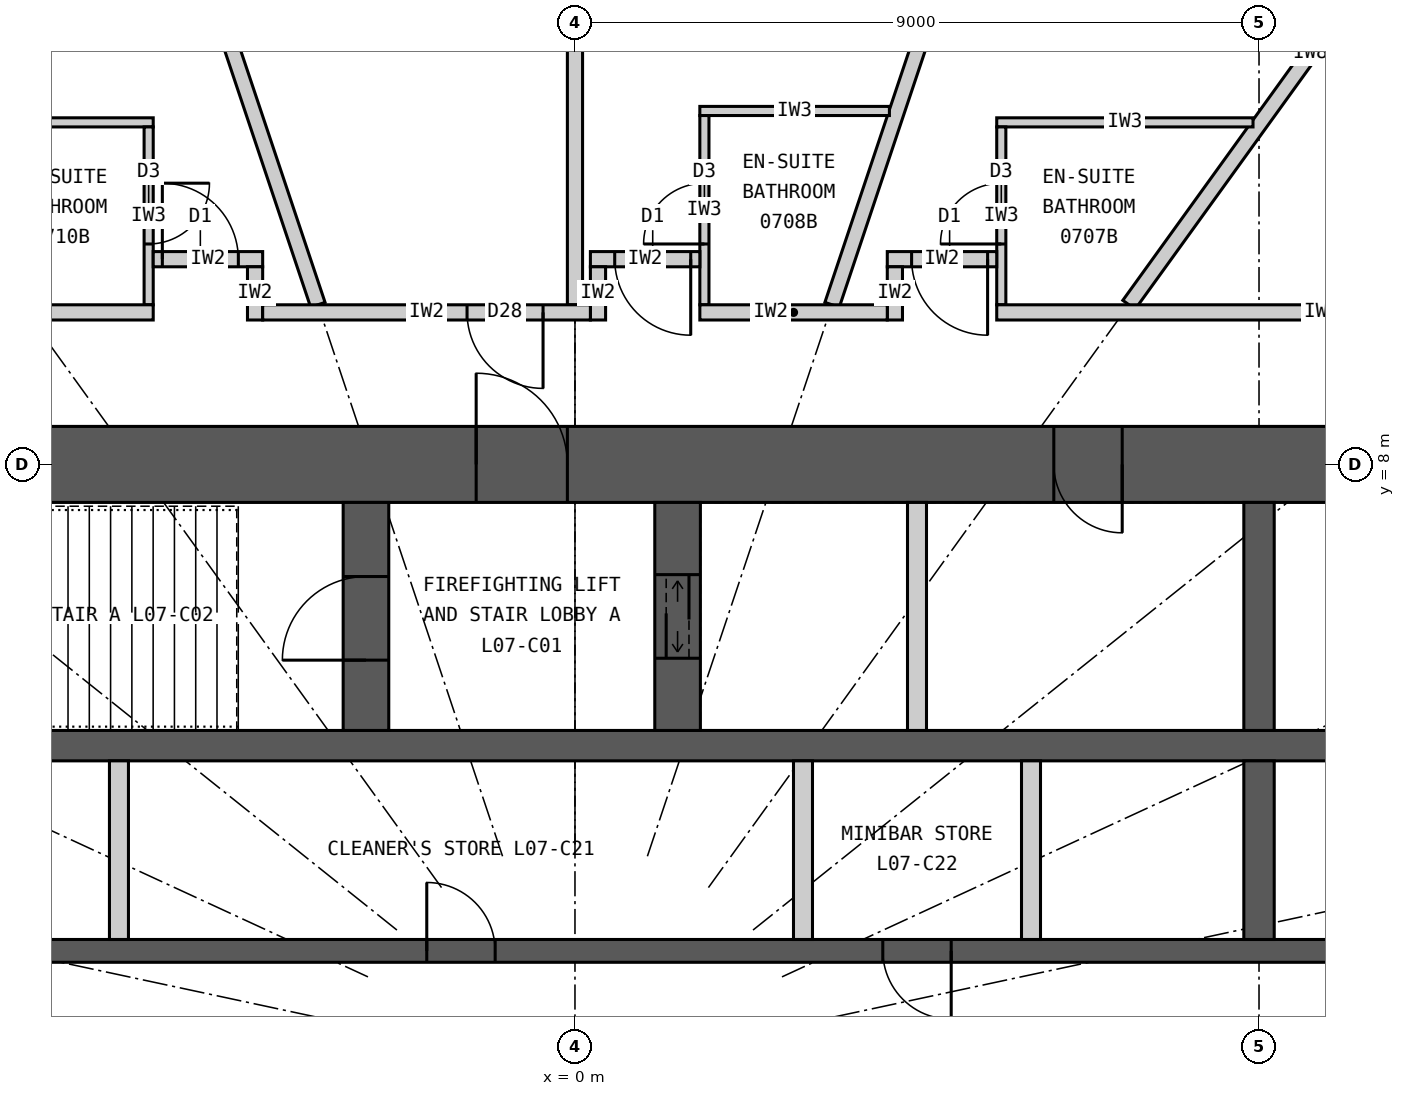
"""IFC4 building model, lengths in metres.
Left out: names, types, materials, properties, quantities, classifications, styles, units other than length and angle.
Written with IfcOpenShell. Run it as: python <this file> out.ifc"""

import sys

from ifc_helpers import new_model, si_unit, direction, frame, frame_2d, origin, place, context, subcontext, project, spatial, rectangle, extrude, element, fill, save


model = new_model("IFC4")
c1 = context("Model", 3, precision=1e-05, world=origin(), true_north=direction((0.0, 1.0)))
c2 = subcontext(c1, "Body", "Model", "MODEL_VIEW")
j1 = project(units=[si_unit("LENGTHUNIT", "METRE"), si_unit("PLANEANGLEUNIT", "RADIAN")], contexts=[c1])
p1 = place(None, origin())
s1 = spatial("IfcSite", under=j1, at=p1, CompositionType="ELEMENT")
p2 = place(p1, origin())
s2 = spatial("IfcBuilding", under=s1, at=p2, CompositionType="ELEMENT")
p3 = place(p2, frame((0.0, 0.0, 36.0)))
s3 = spatial("IfcBuildingStorey", under=s2, at=p3, CompositionType="ELEMENT", Elevation=36.0)
p4 = place(p3, frame((-12.5, 8.0, 0.0), z_axis=(0.0, 0.0, 1.0), x_axis=(1.0, 0.0, 0.0)))
e1 = element("IfcWall", 1, at=p4, inside=s3, PredefinedType="SHEAR", context=c2, shape_type="SweptSolid", body=[
    extrude(rectangle(XDim=25.0, YDim=1.0, at=frame_2d((12.5, 0.0))), origin(), (0.0, 0.0, 1.0), 3.3),
])
p5 = place(p4, frame((11.2, 0.0, 0.0)))
e2 = element("IfcOpeningElement", 2, at=p5, cuts=e1, PredefinedType="OPENING", context=c2, shape_type="SweptSolid", body=[
    extrude(rectangle(XDim=1.2, YDim=2.2, at=frame_2d((0.6, 1.1))), frame((0.0, 0.51, 0.0), z_axis=(0.0, -1.0, 0.0), x_axis=(1.0, 0.0, 0.0)), (0.0, 0.0, 1.0), 1.02),
])
p6 = place(p4, frame((18.8, 0.0, 0.0)))
e3 = element("IfcOpeningElement", 3, at=p6, cuts=e1, PredefinedType="OPENING", context=c2, shape_type="SweptSolid", body=[
    extrude(rectangle(XDim=0.9, YDim=2.2, at=frame_2d((0.45, 1.1))), frame((0.0, 0.51, 0.0), z_axis=(0.0, -1.0, 0.0), x_axis=(1.0, 0.0, 0.0)), (0.0, 0.0, 1.0), 1.02),
])
p7 = place(p3, frame((-11.5, 4.3, 0.0), z_axis=(0.0, 0.0, 1.0), x_axis=(1.0, 0.0, 0.0)))
e4 = element("IfcWall", 4, at=p7, inside=s3, PredefinedType="SHEAR", context=c2, shape_type="SweptSolid", body=[
    extrude(rectangle(XDim=23.0, YDim=0.4, at=frame_2d((11.5, 0.0))), origin(), (0.0, 0.0, 1.0), 3.3),
])
p8 = place(p3, frame((-11.5, 1.6, 0.0), z_axis=(0.0, 0.0, 1.0), x_axis=(1.0, 0.0, 0.0)))
e5 = element("IfcWall", 5, at=p8, inside=s3, PredefinedType="SHEAR", context=c2, shape_type="SweptSolid", body=[
    extrude(rectangle(XDim=23.0, YDim=0.3, at=frame_2d((11.5, 0.0))), origin(), (0.0, 0.0, 1.0), 3.3),
])
p9 = place(p8, frame((0.45, 0.0, 0.0)))
e6 = element("IfcOpeningElement", 6, at=p9, cuts=e5, PredefinedType="OPENING", context=c2, shape_type="SweptSolid", body=[
    extrude(rectangle(XDim=1.1, YDim=2.2, at=frame_2d((0.55, 1.1))), frame((0.0, 0.16, 0.0), z_axis=(0.0, -1.0, 0.0), x_axis=(1.0, 0.0, 0.0)), (0.0, 0.0, 1.0), 0.32),
])
p10 = place(p8, frame((3.45, 0.0, 0.0)))
e7 = element("IfcOpeningElement", 7, at=p10, cuts=e5, PredefinedType="OPENING", context=c2, shape_type="SweptSolid", body=[
    extrude(rectangle(XDim=1.1, YDim=2.2, at=frame_2d((0.55, 1.1))), frame((0.0, 0.16, 0.0), z_axis=(0.0, -1.0, 0.0), x_axis=(1.0, 0.0, 0.0)), (0.0, 0.0, 1.0), 0.32),
])
p11 = place(p8, frame((9.55, 0.0, 0.0)))
e8 = element("IfcOpeningElement", 8, at=p11, cuts=e5, PredefinedType="OPENING", context=c2, shape_type="SweptSolid", body=[
    extrude(rectangle(XDim=0.9, YDim=2.2, at=frame_2d((0.45, 1.1))), frame((0.0, 0.16, 0.0), z_axis=(0.0, -1.0, 0.0), x_axis=(1.0, 0.0, 0.0)), (0.0, 0.0, 1.0), 0.32),
])
p12 = place(p8, frame((15.55, 0.0, 0.0)))
e9 = element("IfcOpeningElement", 9, at=p12, cuts=e5, PredefinedType="OPENING", context=c2, shape_type="SweptSolid", body=[
    extrude(rectangle(XDim=0.9, YDim=2.2, at=frame_2d((0.45, 1.1))), frame((0.0, 0.16, 0.0), z_axis=(0.0, -1.0, 0.0), x_axis=(1.0, 0.0, 0.0)), (0.0, 0.0, 1.0), 0.32),
])
p13 = place(p3, frame((9.0, 4.5, 0.0), z_axis=(0.0, 0.0, 1.0), x_axis=(0.0, 1.0, 0.0)))
e10 = element("IfcWall", 10, at=p13, inside=s3, PredefinedType="SHEAR", context=c2, shape_type="SweptSolid", body=[
    extrude(rectangle(XDim=3.0, YDim=0.4, at=frame_2d((1.5, 0.0))), origin(), (0.0, 0.0, 1.0), 3.3),
])
p14 = place(p3, frame((9.0, 1.75, 0.0), z_axis=(0.0, 0.0, 1.0), x_axis=(0.0, 1.0, 0.0)))
e11 = element("IfcWall", 11, at=p14, inside=s3, PredefinedType="SHEAR", context=c2, shape_type="SweptSolid", body=[
    extrude(rectangle(XDim=2.35, YDim=0.4, at=frame_2d((1.175, 0.0))), origin(), (0.0, 0.0, 1.0), 3.3),
])
p15 = place(p3, frame((-2.75, 4.5, 0.0), z_axis=(0.0, 0.0, 1.0), x_axis=(0.0, 1.0, 0.0)))
e12 = element("IfcWall", 12, at=p15, inside=s3, PredefinedType="SHEAR", context=c2, shape_type="SweptSolid", body=[
    extrude(rectangle(XDim=3.0, YDim=0.6, at=frame_2d((1.5, 0.0))), origin(), (0.0, 0.0, 1.0), 3.3),
])
p16 = place(p15, frame((0.925, 0.0, 0.0)))
e13 = element("IfcOpeningElement", 13, at=p16, cuts=e12, PredefinedType="OPENING", context=c2, shape_type="SweptSolid", body=[
    extrude(rectangle(XDim=1.1, YDim=2.2, at=frame_2d((0.55, 1.1))), frame((0.0, 0.31, 0.0), z_axis=(0.0, -1.0, 0.0), x_axis=(1.0, 0.0, 0.0)), (0.0, 0.0, 1.0), 0.62),
])
p17 = place(p3, frame((1.35, 4.5, 0.0), z_axis=(0.0, 0.0, 1.0), x_axis=(0.0, 1.0, 0.0)))
e14 = element("IfcWall", 14, at=p17, inside=s3, PredefinedType="SHEAR", context=c2, shape_type="SweptSolid", body=[
    extrude(rectangle(XDim=3.0, YDim=0.6, at=frame_2d((1.5, 0.0))), origin(), (0.0, 0.0, 1.0), 3.3),
])
p18 = place(p17, frame((0.95, 0.0, 0.0)))
e15 = element("IfcOpeningElement", 15, at=p18, cuts=e14, PredefinedType="OPENING", context=c2, shape_type="SweptSolid", body=[
    extrude(rectangle(XDim=1.1, YDim=2.2, at=frame_2d((0.55, 1.1))), frame((0.0, 0.31, 0.0), z_axis=(0.0, -1.0, 0.0), x_axis=(1.0, 0.0, 0.0)), (0.0, 0.0, 1.0), 0.62),
])
p19 = place(p3, frame((4.5, 4.5, 0.0), z_axis=(0.0, 0.0, 1.0), x_axis=(0.0, 1.0, 0.0)))
e16 = element("IfcWall", 16, at=p19, inside=s3, PredefinedType="PARTITIONING", context=c2, shape_type="SweptSolid", body=[
    extrude(rectangle(XDim=3.0, YDim=0.25, at=frame_2d((1.5, 0.0))), origin(), (0.0, 0.0, 1.0), 3.3),
])
for number, where, z_axis, x_axis in (
    (17, (-6.0, 1.75, 0.0), (0.0, 0.0, 1.0), (0.0, 1.0, 0.0)),
    (18, (3.0, 1.75, 0.0), (0.0, 0.0, 1.0), (0.0, 1.0, 0.0)),
    (19, (6.0, 1.75, 0.0), (0.0, 0.0, 1.0), (0.0, 1.0, 0.0)),
):
    element("IfcWall", number, at=place(p3, frame(where, z_axis=z_axis, x_axis=x_axis)), inside=s3, PredefinedType="PARTITIONING", context=c2, shape_type="SweptSolid", body=[
        extrude(rectangle(XDim=2.35, YDim=0.25, at=frame_2d((1.175, 0.0))), origin(), (0.0, 0.0, 1.0), 3.3),
    ])
p20 = place(p3, frame((7.289, 10.1, 0.0), z_axis=(0.0, 0.0, 1.0), x_axis=(0.585216319319, 0.810877216108, 0.0)))
e20 = element("IfcWall", 20, at=p20, inside=s3, PredefinedType="PARTITIONING", context=c2, shape_type="SweptSolid", body=[
    extrude(rectangle(XDim=8.16, YDim=0.2, at=frame_2d((4.08, 0.0))), origin(), (0.0, 0.0, 1.0), 2.32),
])
p21 = place(p3, frame((3.383, 10.1, 0.0), z_axis=(0.0, 0.0, 1.0), x_axis=(0.317593727596, 0.948226884344, 0.0)))
e21 = element("IfcWall", 21, at=p21, inside=s3, PredefinedType="PARTITIONING", context=c2, shape_type="SweptSolid", body=[
    extrude(rectangle(XDim=8.899, YDim=0.2, at=frame_2d((4.449, 0.0))), origin(), (0.0, 0.0, 1.0), 2.32),
])
p22 = place(p3, frame((0.0, 10.1, 0.0), z_axis=(0.0, 0.0, 1.0), x_axis=(0.0, 1.0, 0.0)))
e22 = element("IfcWall", 22, at=p22, inside=s3, PredefinedType="PARTITIONING", context=c2, shape_type="SweptSolid", body=[
    extrude(rectangle(XDim=9.05, YDim=0.2, at=frame_2d((4.525, 0.0))), origin(), (0.0, 0.0, 1.0), 2.32),
])
p23 = place(p3, frame((-3.383, 10.1, 0.0), z_axis=(0.0, 0.0, 1.0), x_axis=(-0.317593727596, 0.948226884344, 0.0)))
e23 = element("IfcWall", 23, at=p23, inside=s3, PredefinedType="PARTITIONING", context=c2, shape_type="SweptSolid", body=[
    extrude(rectangle(XDim=8.899, YDim=0.2, at=frame_2d((4.449, 0.0))), origin(), (0.0, 0.0, 1.0), 2.32),
])
p24 = place(p3, frame((8.921, 12.5, 0.0), z_axis=(0.0, 0.0, 1.0), x_axis=(-1.0, 0.0, 0.0)))
e24 = element("IfcWall", 24, at=p24, inside=s3, PredefinedType="PARTITIONING", context=c2, shape_type="SweptSolid", body=[
    extrude(rectangle(XDim=3.372, YDim=0.12, at=frame_2d((1.686, 0.0))), origin(), (0.0, 0.0, 1.0), 3.12),
])
p25 = place(p3, frame((5.609, 10.1, 0.0), z_axis=(0.0, 0.0, 1.0), x_axis=(0.0, 1.0, 0.0)))
e25 = element("IfcWall", 25, at=p25, inside=s3, PredefinedType="PARTITIONING", context=c2, shape_type="SweptSolid", body=[
    extrude(rectangle(XDim=2.34, YDim=0.12, at=frame_2d((1.17, 0.0))), origin(), (0.0, 0.0, 1.0), 3.12),
])
p26 = place(p25, frame((0.8, 0.0, 0.0)))
e26 = element("IfcOpeningElement", 26, at=p26, cuts=e25, PredefinedType="OPENING", context=c2, shape_type="SweptSolid", body=[
    extrude(rectangle(XDim=0.8, YDim=2.1, at=frame_2d((0.4, 1.05))), frame((0.0, 0.07, 0.0), z_axis=(0.0, -1.0, 0.0), x_axis=(1.0, 0.0, 0.0)), (0.0, 0.0, 1.0), 0.14),
])
p27 = place(p3, frame((4.137, 12.65, 0.0), z_axis=(0.0, 0.0, 1.0), x_axis=(-1.0, 0.0, 0.0)))
e27 = element("IfcWall", 27, at=p27, inside=s3, PredefinedType="PARTITIONING", context=c2, shape_type="SweptSolid", body=[
    extrude(rectangle(XDim=2.494, YDim=0.12, at=frame_2d((1.247, 0.0))), origin(), (0.0, 0.0, 1.0), 3.12),
])
p28 = place(p3, frame((1.703, 10.1, 0.0), z_axis=(0.0, 0.0, 1.0), x_axis=(0.0, 1.0, 0.0)))
e28 = element("IfcWall", 28, at=p28, inside=s3, PredefinedType="PARTITIONING", context=c2, shape_type="SweptSolid", body=[
    extrude(rectangle(XDim=2.49, YDim=0.12, at=frame_2d((1.245, 0.0))), origin(), (0.0, 0.0, 1.0), 3.12),
])
p29 = place(p28, frame((0.8, 0.0, 0.0)))
e29 = element("IfcOpeningElement", 29, at=p29, cuts=e28, PredefinedType="OPENING", context=c2, shape_type="SweptSolid", body=[
    extrude(rectangle(XDim=0.8, YDim=2.1, at=frame_2d((0.4, 1.05))), frame((0.0, 0.07, 0.0), z_axis=(0.0, -1.0, 0.0), x_axis=(1.0, 0.0, 0.0)), (0.0, 0.0, 1.0), 0.14),
])
p30 = place(p3, frame((-8.921, 12.5, 0.0), z_axis=(0.0, 0.0, 1.0), x_axis=(1.0, 0.0, 0.0)))
e30 = element("IfcWall", 30, at=p30, inside=s3, PredefinedType="PARTITIONING", context=c2, shape_type="SweptSolid", body=[
    extrude(rectangle(XDim=3.372, YDim=0.12, at=frame_2d((1.686, 0.0))), origin(), (0.0, 0.0, 1.0), 3.12),
])
p31 = place(p3, frame((-5.609, 10.1, 0.0), z_axis=(0.0, 0.0, 1.0), x_axis=(0.0, 1.0, 0.0)))
e31 = element("IfcWall", 31, at=p31, inside=s3, PredefinedType="PARTITIONING", context=c2, shape_type="SweptSolid", body=[
    extrude(rectangle(XDim=2.34, YDim=0.12, at=frame_2d((1.17, 0.0))), origin(), (0.0, 0.0, 1.0), 3.12),
])
p32 = place(p31, frame((0.8, 0.0, 0.0)))
e32 = element("IfcOpeningElement", 32, at=p32, cuts=e31, PredefinedType="OPENING", context=c2, shape_type="SweptSolid", body=[
    extrude(rectangle(XDim=0.8, YDim=2.1, at=frame_2d((0.4, 1.05))), frame((0.0, 0.07, 0.0), z_axis=(0.0, -1.0, 0.0), x_axis=(1.0, 0.0, 0.0)), (0.0, 0.0, 1.0), 0.14),
])
p33 = place(p3, frame((4.109, 10.7, 0.0), z_axis=(0.0, 0.0, 1.0), x_axis=(1.0, 0.0, 0.0)))
e33 = element("IfcWall", 33, at=p33, inside=s3, PredefinedType="PARTITIONING", context=c2, shape_type="SweptSolid", body=[
    extrude(rectangle(XDim=1.44, YDim=0.2, at=frame_2d((0.72, 0.0))), origin(), (0.0, 0.0, 1.0), 3.12),
])
p34 = place(p33, frame((0.32, 0.0, 0.0)))
e34 = element("IfcOpeningElement", 34, at=p34, cuts=e33, PredefinedType="OPENING", context=c2, shape_type="SweptSolid", body=[
    extrude(rectangle(XDim=1.0, YDim=2.2, at=frame_2d((0.5, 1.1))), frame((0.0, 0.11, 0.0), z_axis=(0.0, -1.0, 0.0), x_axis=(1.0, 0.0, 0.0)), (0.0, 0.0, 1.0), 0.22),
])
p35 = place(p3, frame((4.209, 9.9, 0.0), z_axis=(0.0, 0.0, 1.0), x_axis=(0.0, 1.0, 0.0)))
e35 = element("IfcWall", 35, at=p35, inside=s3, PredefinedType="PARTITIONING", context=c2, shape_type="SweptSolid", body=[
    extrude(rectangle(XDim=0.7, YDim=0.2, at=frame_2d((0.35, 0.0))), origin(), (0.0, 0.0, 1.0), 3.12),
])
p36 = place(p3, frame((0.203, 10.7, 0.0), z_axis=(0.0, 0.0, 1.0), x_axis=(1.0, 0.0, 0.0)))
e36 = element("IfcWall", 36, at=p36, inside=s3, PredefinedType="PARTITIONING", context=c2, shape_type="SweptSolid", body=[
    extrude(rectangle(XDim=1.44, YDim=0.2, at=frame_2d((0.72, 0.0))), origin(), (0.0, 0.0, 1.0), 3.12),
])
p37 = place(p36, frame((0.32, 0.0, 0.0)))
e37 = element("IfcOpeningElement", 37, at=p37, cuts=e36, PredefinedType="OPENING", context=c2, shape_type="SweptSolid", body=[
    extrude(rectangle(XDim=1.0, YDim=2.2, at=frame_2d((0.5, 1.1))), frame((0.0, 0.11, 0.0), z_axis=(0.0, -1.0, 0.0), x_axis=(1.0, 0.0, 0.0)), (0.0, 0.0, 1.0), 0.22),
])
p38 = place(p3, frame((0.303, 9.9, 0.0), z_axis=(0.0, 0.0, 1.0), x_axis=(0.0, 1.0, 0.0)))
e38 = element("IfcWall", 38, at=p38, inside=s3, PredefinedType="PARTITIONING", context=c2, shape_type="SweptSolid", body=[
    extrude(rectangle(XDim=0.7, YDim=0.2, at=frame_2d((0.35, 0.0))), origin(), (0.0, 0.0, 1.0), 3.12),
])
p39 = place(p3, frame((-5.549, 10.7, 0.0), z_axis=(0.0, 0.0, 1.0), x_axis=(1.0, 0.0, 0.0)))
e39 = element("IfcWall", 39, at=p39, inside=s3, PredefinedType="PARTITIONING", context=c2, shape_type="SweptSolid", body=[
    extrude(rectangle(XDim=1.44, YDim=0.2, at=frame_2d((0.72, 0.0))), origin(), (0.0, 0.0, 1.0), 3.12),
])
p40 = place(p39, frame((0.12, 0.0, 0.0)))
e40 = element("IfcOpeningElement", 40, at=p40, cuts=e39, PredefinedType="OPENING", context=c2, shape_type="SweptSolid", body=[
    extrude(rectangle(XDim=1.0, YDim=2.2, at=frame_2d((0.5, 1.1))), frame((0.0, 0.11, 0.0), z_axis=(0.0, -1.0, 0.0), x_axis=(1.0, 0.0, 0.0)), (0.0, 0.0, 1.0), 0.22),
])
p41 = place(p3, frame((-4.209, 9.9, 0.0), z_axis=(0.0, 0.0, 1.0), x_axis=(0.0, 1.0, 0.0)))
e41 = element("IfcWall", 41, at=p41, inside=s3, PredefinedType="PARTITIONING", context=c2, shape_type="SweptSolid", body=[
    extrude(rectangle(XDim=0.7, YDim=0.2, at=frame_2d((0.35, 0.0))), origin(), (0.0, 0.0, 1.0), 3.12),
])
p42 = place(p3, frame((-10.179, 10.0, 0.0), z_axis=(0.0, 0.0, 1.0), x_axis=(1.0, 0.0, 0.0)))
e42 = element("IfcWall", 42, at=p42, inside=s3, PredefinedType="PARTITIONING", context=c2, shape_type="SweptSolid", body=[
    extrude(rectangle(XDim=4.63, YDim=0.2, at=frame_2d((2.315, 0.0))), origin(), (0.0, 0.0, 1.0), 3.12),
])
p43 = place(p3, frame((-4.109, 10.0, 0.0), z_axis=(0.0, 0.0, 1.0), x_axis=(1.0, 0.0, 0.0)))
e43 = element("IfcWall", 43, at=p43, inside=s3, PredefinedType="PARTITIONING", context=c2, shape_type="SweptSolid", body=[
    extrude(rectangle(XDim=4.312, YDim=0.2, at=frame_2d((2.156, 0.0))), origin(), (0.0, 0.0, 1.0), 3.12),
])
p44 = place(p43, frame((2.689, 0.0, 0.0)))
e44 = element("IfcOpeningElement", 44, at=p44, cuts=e43, PredefinedType="OPENING", context=c2, shape_type="SweptSolid", body=[
    extrude(rectangle(XDim=1.0, YDim=2.2, at=frame_2d((0.5, 1.1))), frame((0.0, 0.11, 0.0), z_axis=(0.0, -1.0, 0.0), x_axis=(1.0, 0.0, 0.0)), (0.0, 0.0, 1.0), 0.22),
])
p45 = place(p3, frame((1.643, 10.0, 0.0), z_axis=(0.0, 0.0, 1.0), x_axis=(1.0, 0.0, 0.0)))
e45 = element("IfcWall", 45, at=p45, inside=s3, PredefinedType="PARTITIONING", context=c2, shape_type="SweptSolid", body=[
    extrude(rectangle(XDim=2.466, YDim=0.2, at=frame_2d((1.233, 0.0))), origin(), (0.0, 0.0, 1.0), 3.12),
])
p46 = place(p3, frame((5.549, 10.0, 0.0), z_axis=(0.0, 0.0, 1.0), x_axis=(1.0, 0.0, 0.0)))
e46 = element("IfcWall", 46, at=p46, inside=s3, PredefinedType="PARTITIONING", context=c2, shape_type="SweptSolid", body=[
    extrude(rectangle(XDim=8.551, YDim=0.2, at=frame_2d((4.275, 0.0))), origin(), (0.0, 0.0, 1.0), 3.12),
])
p47 = place(p46, frame((5.656, 0.0, 0.0)))
e47 = element("IfcOpeningElement", 47, at=p47, cuts=e46, PredefinedType="OPENING", context=c2, shape_type="SweptSolid", body=[
    extrude(rectangle(XDim=1.0, YDim=2.2, at=frame_2d((0.5, 1.1))), frame((0.0, 0.11, 0.0), z_axis=(0.0, -1.0, 0.0), x_axis=(1.0, 0.0, 0.0)), (0.0, 0.0, 1.0), 0.22),
])
p48 = place(p26, origin())
e48 = element("IfcDoor", 48, at=p48, inside=s3, OperationType="SINGLE_SWING_LEFT", PredefinedType="DOOR", context=c2, shape_type="SweptSolid", body=[
    extrude(rectangle(XDim=0.8, YDim=2.1, at=frame_2d((0.4, 1.05))), frame((0.0, 0.025, 0.0), z_axis=(0.0, -1.0, 0.0), x_axis=(1.0, 0.0, 0.0)), (0.0, 0.0, 1.0), 0.05),
])
fill(e26, e48)
p49 = place(p34, origin())
e49 = element("IfcDoor", 49, at=p49, inside=s3, OperationType="SINGLE_SWING_RIGHT", PredefinedType="DOOR", context=c2, shape_type="SweptSolid", body=[
    extrude(rectangle(XDim=1.0, YDim=2.2, at=frame_2d((0.5, 1.1))), frame((0.0, 0.025, 0.0), z_axis=(0.0, -1.0, 0.0), x_axis=(1.0, 0.0, 0.0)), (0.0, 0.0, 1.0), 0.05),
])
fill(e34, e49)
p50 = place(p29, origin())
e50 = element("IfcDoor", 50, at=p50, inside=s3, OperationType="SINGLE_SWING_LEFT", PredefinedType="DOOR", context=c2, shape_type="SweptSolid", body=[
    extrude(rectangle(XDim=0.8, YDim=2.1, at=frame_2d((0.4, 1.05))), frame((0.0, 0.025, 0.0), z_axis=(0.0, -1.0, 0.0), x_axis=(1.0, 0.0, 0.0)), (0.0, 0.0, 1.0), 0.05),
])
fill(e29, e50)
p51 = place(p37, origin())
e51 = element("IfcDoor", 51, at=p51, inside=s3, OperationType="SINGLE_SWING_RIGHT", PredefinedType="DOOR", context=c2, shape_type="SweptSolid", body=[
    extrude(rectangle(XDim=1.0, YDim=2.2, at=frame_2d((0.5, 1.1))), frame((0.0, 0.025, 0.0), z_axis=(0.0, -1.0, 0.0), x_axis=(1.0, 0.0, 0.0)), (0.0, 0.0, 1.0), 0.05),
])
fill(e37, e51)
p52 = place(p44, origin())
e52 = element("IfcDoor", 52, at=p52, inside=s3, OperationType="SINGLE_SWING_RIGHT", PredefinedType="DOOR", context=c2, shape_type="SweptSolid", body=[
    extrude(rectangle(XDim=1.0, YDim=2.2, at=frame_2d((0.5, 1.1))), frame((0.0, 0.025, 0.0), z_axis=(0.0, -1.0, 0.0), x_axis=(1.0, 0.0, 0.0)), (0.0, 0.0, 1.0), 0.05),
])
fill(e44, e52)
p53 = place(p32, origin())
e53 = element("IfcDoor", 53, at=p53, inside=s3, OperationType="SINGLE_SWING_RIGHT", PredefinedType="DOOR", context=c2, shape_type="SweptSolid", body=[
    extrude(rectangle(XDim=0.8, YDim=2.1, at=frame_2d((0.4, 1.05))), frame((0.0, 0.025, 0.0), z_axis=(0.0, -1.0, 0.0), x_axis=(1.0, 0.0, 0.0)), (0.0, 0.0, 1.0), 0.05),
])
fill(e32, e53)
p54 = place(p40, origin())
e54 = element("IfcDoor", 54, at=p54, inside=s3, OperationType="SINGLE_SWING_LEFT", PredefinedType="DOOR", context=c2, shape_type="SweptSolid", body=[
    extrude(rectangle(XDim=1.0, YDim=2.2, at=frame_2d((0.5, 1.1))), frame((0.0, 0.025, 0.0), z_axis=(0.0, -1.0, 0.0), x_axis=(1.0, 0.0, 0.0)), (0.0, 0.0, 1.0), 0.05),
])
fill(e40, e54)
p55 = place(p5, origin())
e55 = element("IfcDoor", 55, at=p55, inside=s3, OperationType="SINGLE_SWING_LEFT", PredefinedType="DOOR", context=c2, shape_type="SweptSolid", body=[
    extrude(rectangle(XDim=1.2, YDim=2.2, at=frame_2d((0.6, 1.1))), frame((0.0, 0.025, 0.0), z_axis=(0.0, -1.0, 0.0), x_axis=(1.0, 0.0, 0.0)), (0.0, 0.0, 1.0), 0.05),
])
fill(e2, e55)
p56 = place(p16, origin())
e56 = element("IfcDoor", 56, at=p56, inside=s3, OperationType="SINGLE_SWING_LEFT", PredefinedType="DOOR", context=c2, shape_type="SweptSolid", body=[
    extrude(rectangle(XDim=1.1, YDim=2.2, at=frame_2d((0.55, 1.1))), frame((0.0, 0.025, 0.0), z_axis=(0.0, -1.0, 0.0), x_axis=(1.0, 0.0, 0.0)), (0.0, 0.0, 1.0), 0.05),
])
fill(e13, e56)
p57 = place(p18, origin())
e57 = element("IfcDoor", 57, at=p57, inside=s3, OperationType="DOUBLE_DOOR_SLIDING", PredefinedType="DOOR", context=c2, shape_type="SweptSolid", body=[
    extrude(rectangle(XDim=1.1, YDim=2.2, at=frame_2d((0.55, 1.1))), frame((0.0, 0.025, 0.0), z_axis=(0.0, -1.0, 0.0), x_axis=(1.0, 0.0, 0.0)), (0.0, 0.0, 1.0), 0.05),
])
fill(e15, e57)
p58 = place(p6, origin())
e58 = element("IfcDoor", 58, at=p58, inside=s3, OperationType="SINGLE_SWING_RIGHT", PredefinedType="DOOR", context=c2, shape_type="SweptSolid", body=[
    extrude(rectangle(XDim=0.9, YDim=2.2, at=frame_2d((0.45, 1.1))), frame((0.0, 0.025, 0.0), z_axis=(0.0, -1.0, 0.0), x_axis=(1.0, 0.0, 0.0)), (0.0, 0.0, 1.0), 0.05),
])
fill(e3, e58)
p59 = place(p11, origin())
e59 = element("IfcDoor", 59, at=p59, inside=s3, OperationType="SINGLE_SWING_LEFT", PredefinedType="DOOR", context=c2, shape_type="SweptSolid", body=[
    extrude(rectangle(XDim=0.9, YDim=2.2, at=frame_2d((0.45, 1.1))), frame((0.0, 0.025, 0.0), z_axis=(0.0, -1.0, 0.0), x_axis=(1.0, 0.0, 0.0)), (0.0, 0.0, 1.0), 0.05),
])
fill(e8, e59)
p60 = place(p12, origin())
e60 = element("IfcDoor", 60, at=p60, inside=s3, OperationType="SINGLE_SWING_RIGHT", PredefinedType="DOOR", context=c2, shape_type="SweptSolid", body=[
    extrude(rectangle(XDim=0.9, YDim=2.2, at=frame_2d((0.45, 1.1))), frame((0.0, 0.025, 0.0), z_axis=(0.0, -1.0, 0.0), x_axis=(1.0, 0.0, 0.0)), (0.0, 0.0, 1.0), 0.05),
])
fill(e9, e60)
save(model, sys.argv[1])
